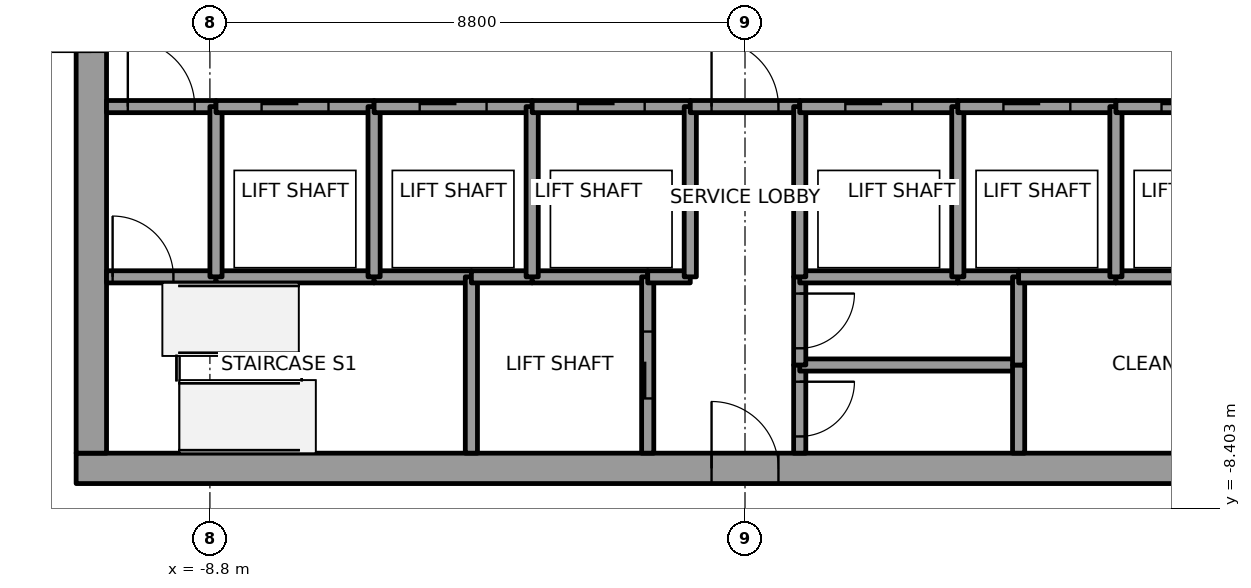
"""IFC4 building model, lengths in metres.
Left out: names, types, materials, properties, quantities, classifications, styles, units other than length and angle.
Written with IfcOpenShell. Run it as: python <this file> out.ifc"""

import sys

from ifc_helpers import new_model, si_unit, direction, frame, frame_2d, origin, place, context, subcontext, project, spatial, rectangle, extrude, element, fill, save


model = new_model("IFC4")
c1 = context("Model", 3, precision=1e-05, world=origin(), true_north=direction((0.0, 1.0)))
c2 = subcontext(c1, "Body", "Model", "MODEL_VIEW")
j1 = project(units=[si_unit("LENGTHUNIT", "METRE"), si_unit("PLANEANGLEUNIT", "RADIAN")], contexts=[c1])
p1 = place(None, origin())
s1 = spatial("IfcSite", under=j1, at=p1, CompositionType="ELEMENT")
p2 = place(p1, origin())
s2 = spatial("IfcBuilding", under=s1, at=p2, CompositionType="ELEMENT")
p3 = place(p2, frame((0.0, 0.0, 339.4)))
s3 = spatial("IfcBuildingStorey", under=s2, at=p3, CompositionType="ELEMENT", Elevation=339.4)
p4 = place(p3, frame((-11.0, -7.75, 0.0), z_axis=(0.0, 0.0, 1.0), x_axis=(1.0, 0.0, 0.0)))
e1 = element("IfcWall", 1, at=p4, inside=s3, PredefinedType="SHEAR", context=c2, shape_type="SweptSolid", body=[
    extrude(rectangle(XDim=22.0, YDim=0.5, at=frame_2d((11.0, 0.0))), origin(), (0.0, 0.0, 1.0), 5.4),
])
p5 = place(p4, frame((10.45, 0.0, 0.0)))
e2 = element("IfcOpeningElement", 2, at=p5, cuts=e1, PredefinedType="OPENING", context=c2, shape_type="SweptSolid", body=[
    extrude(rectangle(XDim=1.1, YDim=2.1, at=frame_2d((0.55, 1.05))), frame((0.0, 0.25, 0.0), z_axis=(0.0, -1.0, 0.0), x_axis=(1.0, 0.0, 0.0)), (0.0, 0.0, 1.0), 0.5),
])
p6 = place(p3, frame((-10.75, -7.5, 0.0), z_axis=(0.0, 0.0, 1.0), x_axis=(0.0, 1.0, 0.0)))
e3 = element("IfcWall", 3, at=p6, inside=s3, PredefinedType="SHEAR", context=c2, shape_type="SweptSolid", body=[
    extrude(rectangle(XDim=15.0, YDim=0.5, at=frame_2d((7.5, 0.0))), origin(), (0.0, 0.0, 1.0), 5.4),
])
p7 = place(p6, frame((6.6, 0.0, 0.0)))
e4 = element("IfcOpeningElement", 4, at=p7, cuts=e3, PredefinedType="OPENING", context=c2, shape_type="SweptSolid", body=[
    extrude(rectangle(XDim=1.8, YDim=2.1, at=frame_2d((0.9, 1.05))), frame((0.0, 0.25, 0.0), z_axis=(0.0, -1.0, 0.0), x_axis=(1.0, 0.0, 0.0)), (0.0, 0.0, 1.0), 0.5),
])
p8 = place(p3, frame((-10.5, -4.6, 0.0), z_axis=(0.0, 0.0, 1.0), x_axis=(1.0, 0.0, 0.0)))
e5 = element("IfcWall", 5, at=p8, inside=s3, PredefinedType="SOLIDWALL", context=c2, shape_type="SweptSolid", body=[
    extrude(rectangle(XDim=1.8, YDim=0.2, at=frame_2d((0.9, 0.0))), origin(), (0.0, 0.0, 1.0), 5.25),
])
p9 = place(p8, frame((0.1, 0.0, 0.0)))
e6 = element("IfcOpeningElement", 6, at=p9, cuts=e5, PredefinedType="OPENING", context=c2, shape_type="SweptSolid", body=[
    extrude(rectangle(XDim=1.0, YDim=2.1, at=frame_2d((0.5, 1.05))), frame((0.0, 0.1, 0.0), z_axis=(0.0, -1.0, 0.0), x_axis=(1.0, 0.0, 0.0)), (0.0, 0.0, 1.0), 0.2),
])
p10 = place(p3, frame((-10.5, -1.8, 0.0), z_axis=(0.0, 0.0, 1.0), x_axis=(1.0, 0.0, 0.0)))
e7 = element("IfcWall", 7, at=p10, inside=s3, PredefinedType="SOLIDWALL", context=c2, shape_type="SweptSolid", body=[
    extrude(rectangle(XDim=1.8, YDim=0.2, at=frame_2d((0.9, 0.0))), origin(), (0.0, 0.0, 1.0), 5.25),
])
p11 = place(p10, frame((0.35, 0.0, 0.0)))
e8 = element("IfcOpeningElement", 8, at=p11, cuts=e7, PredefinedType="OPENING", context=c2, shape_type="SweptSolid", body=[
    extrude(rectangle(XDim=1.1, YDim=2.1, at=frame_2d((0.55, 1.05))), frame((0.0, 0.1, 0.0), z_axis=(0.0, -1.0, 0.0), x_axis=(1.0, 0.0, 0.0)), (0.0, 0.0, 1.0), 0.2),
])
p12 = place(p3, frame((-8.7, -4.6, 0.0), z_axis=(0.0, 0.0, 1.0), x_axis=(1.0, 0.0, 0.0)))
e9 = element("IfcWall", 9, at=p12, inside=s3, PredefinedType="SOLIDWALL", context=c2, shape_type="SweptSolid", body=[
    extrude(rectangle(XDim=2.6, YDim=0.2, at=frame_2d((1.3, 0.0))), origin(), (0.0, 0.0, 1.0), 5.25),
])
p13 = place(p3, frame((-8.7, -4.6, 0.0), z_axis=(0.0, 0.0, 1.0), x_axis=(0.0, 1.0, 0.0)))
e10 = element("IfcWall", 10, at=p13, inside=s3, PredefinedType="SOLIDWALL", context=c2, shape_type="SweptSolid", body=[
    extrude(rectangle(XDim=2.8, YDim=0.2, at=frame_2d((1.4, 0.0))), origin(), (0.0, 0.0, 1.0), 5.25),
])
p14 = place(p3, frame((-8.7, -1.8, 0.0), z_axis=(0.0, 0.0, 1.0), x_axis=(1.0, 0.0, 0.0)))
e11 = element("IfcWall", 11, at=p14, inside=s3, PredefinedType="SOLIDWALL", context=c2, shape_type="SweptSolid", body=[
    extrude(rectangle(XDim=2.6, YDim=0.2, at=frame_2d((1.3, 0.0))), origin(), (0.0, 0.0, 1.0), 5.25),
])
p15 = place(p14, frame((0.75, 0.0, 0.0)))
e12 = element("IfcOpeningElement", 12, at=p15, cuts=e11, PredefinedType="OPENING", context=c2, shape_type="SweptSolid", body=[
    extrude(rectangle(XDim=1.1, YDim=2.1, at=frame_2d((0.55, 1.05))), frame((0.0, 0.1, 0.0), z_axis=(0.0, -1.0, 0.0), x_axis=(1.0, 0.0, 0.0)), (0.0, 0.0, 1.0), 0.2),
])
p16 = place(p3, frame((-6.1, -4.6, 0.0), z_axis=(0.0, 0.0, 1.0), x_axis=(1.0, 0.0, 0.0)))
e13 = element("IfcWall", 13, at=p16, inside=s3, PredefinedType="SOLIDWALL", context=c2, shape_type="SweptSolid", body=[
    extrude(rectangle(XDim=1.6, YDim=0.2, at=frame_2d((0.8, 0.0))), origin(), (0.0, 0.0, 1.0), 5.25),
])
p17 = place(p3, frame((-6.1, -4.6, 0.0), z_axis=(0.0, 0.0, 1.0), x_axis=(0.0, 1.0, 0.0)))
e14 = element("IfcWall", 14, at=p17, inside=s3, PredefinedType="SOLIDWALL", context=c2, shape_type="SweptSolid", body=[
    extrude(rectangle(XDim=2.8, YDim=0.2, at=frame_2d((1.4, 0.0))), origin(), (0.0, 0.0, 1.0), 5.25),
])
p18 = place(p3, frame((-6.1, -1.8, 0.0), z_axis=(0.0, 0.0, 1.0), x_axis=(1.0, 0.0, 0.0)))
e15 = element("IfcWall", 15, at=p18, inside=s3, PredefinedType="SOLIDWALL", context=c2, shape_type="SweptSolid", body=[
    extrude(rectangle(XDim=2.6, YDim=0.2, at=frame_2d((1.3, 0.0))), origin(), (0.0, 0.0, 1.0), 5.25),
])
p19 = place(p18, frame((0.75, 0.0, 0.0)))
e16 = element("IfcOpeningElement", 16, at=p19, cuts=e15, PredefinedType="OPENING", context=c2, shape_type="SweptSolid", body=[
    extrude(rectangle(XDim=1.1, YDim=2.1, at=frame_2d((0.55, 1.05))), frame((0.0, 0.1, 0.0), z_axis=(0.0, -1.0, 0.0), x_axis=(1.0, 0.0, 0.0)), (0.0, 0.0, 1.0), 0.2),
])
p20 = place(p3, frame((-4.5, -4.6, 0.0), z_axis=(0.0, 0.0, 1.0), x_axis=(0.0, -1.0, 0.0)))
e17 = element("IfcWall", 17, at=p20, inside=s3, PredefinedType="SOLIDWALL", context=c2, shape_type="SweptSolid", body=[
    extrude(rectangle(XDim=2.9, YDim=0.2, at=frame_2d((1.45, 0.0))), origin(), (0.0, 0.0, 1.0), 5.25),
])
p21 = place(p3, frame((-4.5, -4.6, 0.0), z_axis=(0.0, 0.0, 1.0), x_axis=(1.0, 0.0, 0.0)))
e18 = element("IfcWall", 18, at=p21, inside=s3, PredefinedType="SOLIDWALL", context=c2, shape_type="SweptSolid", body=[
    extrude(rectangle(XDim=1.0, YDim=0.2, at=frame_2d((0.5, 0.0))), origin(), (0.0, 0.0, 1.0), 5.25),
])
p22 = place(p3, frame((-3.5, -4.6, 0.0), z_axis=(0.0, 0.0, 1.0), x_axis=(1.0, 0.0, 0.0)))
e19 = element("IfcWall", 19, at=p22, inside=s3, PredefinedType="SOLIDWALL", context=c2, shape_type="SweptSolid", body=[
    extrude(rectangle(XDim=1.9, YDim=0.2, at=frame_2d((0.95, 0.0))), origin(), (0.0, 0.0, 1.0), 5.25),
])
p23 = place(p3, frame((-3.5, -4.6, 0.0), z_axis=(0.0, 0.0, 1.0), x_axis=(0.0, 1.0, 0.0)))
e20 = element("IfcWall", 20, at=p23, inside=s3, PredefinedType="SOLIDWALL", context=c2, shape_type="SweptSolid", body=[
    extrude(rectangle(XDim=2.8, YDim=0.2, at=frame_2d((1.4, 0.0))), origin(), (0.0, 0.0, 1.0), 5.25),
])
p24 = place(p3, frame((-3.5, -1.8, 0.0), z_axis=(0.0, 0.0, 1.0), x_axis=(1.0, 0.0, 0.0)))
e21 = element("IfcWall", 21, at=p24, inside=s3, PredefinedType="SOLIDWALL", context=c2, shape_type="SweptSolid", body=[
    extrude(rectangle(XDim=2.6, YDim=0.2, at=frame_2d((1.3, 0.0))), origin(), (0.0, 0.0, 1.0), 5.25),
])
p25 = place(p24, frame((0.75, 0.0, 0.0)))
e22 = element("IfcOpeningElement", 22, at=p25, cuts=e21, PredefinedType="OPENING", context=c2, shape_type="SweptSolid", body=[
    extrude(rectangle(XDim=1.1, YDim=2.1, at=frame_2d((0.55, 1.05))), frame((0.0, 0.1, 0.0), z_axis=(0.0, -1.0, 0.0), x_axis=(1.0, 0.0, 0.0)), (0.0, 0.0, 1.0), 0.2),
])
p26 = place(p3, frame((-1.6, -7.5, 0.0), z_axis=(0.0, 0.0, 1.0), x_axis=(0.0, 1.0, 0.0)))
e23 = element("IfcWall", 23, at=p26, inside=s3, PredefinedType="SOLIDWALL", context=c2, shape_type="SweptSolid", body=[
    extrude(rectangle(XDim=2.9, YDim=0.2, at=frame_2d((1.45, 0.0))), origin(), (0.0, 0.0, 1.0), 5.25),
])
p27 = place(p26, frame((0.9, 0.0, 0.0)))
e24 = element("IfcOpeningElement", 24, at=p27, cuts=e23, PredefinedType="OPENING", context=c2, shape_type="SweptSolid", body=[
    extrude(rectangle(XDim=1.1, YDim=2.1, at=frame_2d((0.55, 1.05))), frame((0.0, 0.1, 0.0), z_axis=(0.0, -1.0, 0.0), x_axis=(1.0, 0.0, 0.0)), (0.0, 0.0, 1.0), 0.2),
])
p28 = place(p3, frame((-1.6, -4.6, 0.0), z_axis=(0.0, 0.0, 1.0), x_axis=(1.0, 0.0, 0.0)))
e25 = element("IfcWall", 25, at=p28, inside=s3, PredefinedType="SOLIDWALL", context=c2, shape_type="SweptSolid", body=[
    extrude(rectangle(XDim=0.7, YDim=0.2, at=frame_2d((0.35, 0.0))), origin(), (0.0, 0.0, 1.0), 5.25),
])
p29 = place(p3, frame((-0.9, -4.6, 0.0), z_axis=(0.0, 0.0, 1.0), x_axis=(0.0, 1.0, 0.0)))
e26 = element("IfcWall", 26, at=p29, inside=s3, PredefinedType="SOLIDWALL", context=c2, shape_type="SweptSolid", body=[
    extrude(rectangle(XDim=2.8, YDim=0.2, at=frame_2d((1.4, 0.0))), origin(), (0.0, 0.0, 1.0), 5.25),
])
p30 = place(p3, frame((-0.9, -1.8, 0.0), z_axis=(0.0, 0.0, 1.0), x_axis=(1.0, 0.0, 0.0)))
e27 = element("IfcWall", 27, at=p30, inside=s3, PredefinedType="SOLIDWALL", context=c2, shape_type="SweptSolid", body=[
    extrude(rectangle(XDim=1.8, YDim=0.2, at=frame_2d((0.9, 0.0))), origin(), (0.0, 0.0, 1.0), 5.25),
])
p31 = place(p30, frame((0.35, 0.0, 0.0)))
e28 = element("IfcOpeningElement", 28, at=p31, cuts=e27, PredefinedType="OPENING", context=c2, shape_type="SweptSolid", body=[
    extrude(rectangle(XDim=1.1, YDim=2.1, at=frame_2d((0.55, 1.05))), frame((0.0, 0.1, 0.0), z_axis=(0.0, -1.0, 0.0), x_axis=(1.0, 0.0, 0.0)), (0.0, 0.0, 1.0), 0.2),
])
p32 = place(p3, frame((0.9, -6.05, 0.0), z_axis=(0.0, 0.0, 1.0), x_axis=(0.0, -1.0, 0.0)))
e29 = element("IfcWall", 29, at=p32, inside=s3, PredefinedType="SOLIDWALL", context=c2, shape_type="SweptSolid", body=[
    extrude(rectangle(XDim=1.45, YDim=0.2, at=frame_2d((0.725, 0.0))), origin(), (0.0, 0.0, 1.0), 5.25),
])
p33 = place(p32, frame((0.275, 0.0, 0.0)))
e30 = element("IfcOpeningElement", 30, at=p33, cuts=e29, PredefinedType="OPENING", context=c2, shape_type="SweptSolid", body=[
    extrude(rectangle(XDim=0.9, YDim=2.1, at=frame_2d((0.45, 1.05))), frame((0.0, 0.1, 0.0), z_axis=(0.0, -1.0, 0.0), x_axis=(1.0, 0.0, 0.0)), (0.0, 0.0, 1.0), 0.2),
])
p34 = place(p3, frame((4.5, -6.05, 0.0), z_axis=(0.0, 0.0, 1.0), x_axis=(-1.0, 0.0, 0.0)))
e31 = element("IfcWall", 31, at=p34, inside=s3, PredefinedType="SOLIDWALL", context=c2, shape_type="SweptSolid", body=[
    extrude(rectangle(XDim=3.6, YDim=0.2, at=frame_2d((1.8, 0.0))), origin(), (0.0, 0.0, 1.0), 5.25),
])
p35 = place(p3, frame((0.9, -4.6, 0.0), z_axis=(0.0, 0.0, 1.0), x_axis=(0.0, -1.0, 0.0)))
e32 = element("IfcWall", 32, at=p35, inside=s3, PredefinedType="SOLIDWALL", context=c2, shape_type="SweptSolid", body=[
    extrude(rectangle(XDim=1.45, YDim=0.2, at=frame_2d((0.725, 0.0))), origin(), (0.0, 0.0, 1.0), 5.25),
])
p36 = place(p35, frame((0.275, 0.0, 0.0)))
e33 = element("IfcOpeningElement", 33, at=p36, cuts=e32, PredefinedType="OPENING", context=c2, shape_type="SweptSolid", body=[
    extrude(rectangle(XDim=0.9, YDim=2.1, at=frame_2d((0.45, 1.05))), frame((0.0, 0.1, 0.0), z_axis=(0.0, -1.0, 0.0), x_axis=(1.0, 0.0, 0.0)), (0.0, 0.0, 1.0), 0.2),
])
p37 = place(p3, frame((3.5, -4.6, 0.0), z_axis=(0.0, 0.0, 1.0), x_axis=(-1.0, 0.0, 0.0)))
e34 = element("IfcWall", 34, at=p37, inside=s3, PredefinedType="SOLIDWALL", context=c2, shape_type="SweptSolid", body=[
    extrude(rectangle(XDim=2.6, YDim=0.2, at=frame_2d((1.3, 0.0))), origin(), (0.0, 0.0, 1.0), 5.25),
])
p38 = place(p3, frame((0.9, -1.8, 0.0), z_axis=(0.0, 0.0, 1.0), x_axis=(0.0, -1.0, 0.0)))
e35 = element("IfcWall", 35, at=p38, inside=s3, PredefinedType="SOLIDWALL", context=c2, shape_type="SweptSolid", body=[
    extrude(rectangle(XDim=2.8, YDim=0.2, at=frame_2d((1.4, 0.0))), origin(), (0.0, 0.0, 1.0), 5.25),
])
p39 = place(p3, frame((0.9, -1.8, 0.0), z_axis=(0.0, 0.0, 1.0), x_axis=(1.0, 0.0, 0.0)))
e36 = element("IfcWall", 36, at=p39, inside=s3, PredefinedType="SOLIDWALL", context=c2, shape_type="SweptSolid", body=[
    extrude(rectangle(XDim=2.6, YDim=0.2, at=frame_2d((1.3, 0.0))), origin(), (0.0, 0.0, 1.0), 5.25),
])
p40 = place(p39, frame((0.75, 0.0, 0.0)))
e37 = element("IfcOpeningElement", 37, at=p40, cuts=e36, PredefinedType="OPENING", context=c2, shape_type="SweptSolid", body=[
    extrude(rectangle(XDim=1.1, YDim=2.1, at=frame_2d((0.55, 1.05))), frame((0.0, 0.1, 0.0), z_axis=(0.0, -1.0, 0.0), x_axis=(1.0, 0.0, 0.0)), (0.0, 0.0, 1.0), 0.2),
])
p41 = place(p3, frame((4.5, -4.6, 0.0), z_axis=(0.0, 0.0, 1.0), x_axis=(-1.0, 0.0, 0.0)))
e38 = element("IfcWall", 38, at=p41, inside=s3, PredefinedType="SOLIDWALL", context=c2, shape_type="SweptSolid", body=[
    extrude(rectangle(XDim=1.0, YDim=0.2, at=frame_2d((0.5, 0.0))), origin(), (0.0, 0.0, 1.0), 5.25),
])
p42 = place(p3, frame((3.5, -4.6, 0.0), z_axis=(0.0, 0.0, 1.0), x_axis=(0.0, 1.0, 0.0)))
e39 = element("IfcWall", 39, at=p42, inside=s3, PredefinedType="SOLIDWALL", context=c2, shape_type="SweptSolid", body=[
    extrude(rectangle(XDim=2.8, YDim=0.2, at=frame_2d((1.4, 0.0))), origin(), (0.0, 0.0, 1.0), 5.25),
])
p43 = place(p3, frame((3.5, -1.8, 0.0), z_axis=(0.0, 0.0, 1.0), x_axis=(1.0, 0.0, 0.0)))
e40 = element("IfcWall", 40, at=p43, inside=s3, PredefinedType="SOLIDWALL", context=c2, shape_type="SweptSolid", body=[
    extrude(rectangle(XDim=2.6, YDim=0.2, at=frame_2d((1.3, 0.0))), origin(), (0.0, 0.0, 1.0), 5.25),
])
p44 = place(p43, frame((0.75, 0.0, 0.0)))
e41 = element("IfcOpeningElement", 41, at=p44, cuts=e40, PredefinedType="OPENING", context=c2, shape_type="SweptSolid", body=[
    extrude(rectangle(XDim=1.1, YDim=2.1, at=frame_2d((0.55, 1.05))), frame((0.0, 0.1, 0.0), z_axis=(0.0, -1.0, 0.0), x_axis=(1.0, 0.0, 0.0)), (0.0, 0.0, 1.0), 0.2),
])
for number, where, z_axis, x_axis in (
    (42, (4.5, -6.05, 0.0), (0.0, 0.0, 1.0), (0.0, -1.0, 0.0)),
    (43, (4.5, -4.6, 0.0), (0.0, 0.0, 1.0), (0.0, -1.0, 0.0)),
):
    element("IfcWall", number, at=place(p3, frame(where, z_axis=z_axis, x_axis=x_axis)), inside=s3, PredefinedType="SOLIDWALL", context=c2, shape_type="SweptSolid", body=[
        extrude(rectangle(XDim=1.45, YDim=0.2, at=frame_2d((0.725, 0.0))), origin(), (0.0, 0.0, 1.0), 5.25),
    ])
p45 = place(p3, frame((6.1, -4.6, 0.0), z_axis=(0.0, 0.0, 1.0), x_axis=(-1.0, 0.0, 0.0)))
e44 = element("IfcWall", 44, at=p45, inside=s3, PredefinedType="SOLIDWALL", context=c2, shape_type="SweptSolid", body=[
    extrude(rectangle(XDim=1.6, YDim=0.2, at=frame_2d((0.8, 0.0))), origin(), (0.0, 0.0, 1.0), 5.25),
])
p46 = place(p3, frame((8.7, -4.6, 0.0), z_axis=(0.0, 0.0, 1.0), x_axis=(-1.0, 0.0, 0.0)))
e45 = element("IfcWall", 45, at=p46, inside=s3, PredefinedType="SOLIDWALL", context=c2, shape_type="SweptSolid", body=[
    extrude(rectangle(XDim=2.6, YDim=0.2, at=frame_2d((1.3, 0.0))), origin(), (0.0, 0.0, 1.0), 5.25),
])
p47 = place(p3, frame((6.1, -4.6, 0.0), z_axis=(0.0, 0.0, 1.0), x_axis=(0.0, 1.0, 0.0)))
e46 = element("IfcWall", 46, at=p47, inside=s3, PredefinedType="SOLIDWALL", context=c2, shape_type="SweptSolid", body=[
    extrude(rectangle(XDim=2.8, YDim=0.2, at=frame_2d((1.4, 0.0))), origin(), (0.0, 0.0, 1.0), 5.25),
])
p48 = place(p3, frame((6.1, -1.8, 0.0), z_axis=(0.0, 0.0, 1.0), x_axis=(1.0, 0.0, 0.0)))
e47 = element("IfcWall", 47, at=p48, inside=s3, PredefinedType="SOLIDWALL", context=c2, shape_type="SweptSolid", body=[
    extrude(rectangle(XDim=2.6, YDim=0.2, at=frame_2d((1.3, 0.0))), origin(), (0.0, 0.0, 1.0), 5.25),
])
p49 = place(p48, frame((0.75, 0.0, 0.0)))
e48 = element("IfcOpeningElement", 48, at=p49, cuts=e47, PredefinedType="OPENING", context=c2, shape_type="SweptSolid", body=[
    extrude(rectangle(XDim=1.1, YDim=2.1, at=frame_2d((0.55, 1.05))), frame((0.0, 0.1, 0.0), z_axis=(0.0, -1.0, 0.0), x_axis=(1.0, 0.0, 0.0)), (0.0, 0.0, 1.0), 0.2),
])
p50 = place(p15, origin())
e49 = element("IfcDoor", 49, at=p50, inside=s3, OperationType="SLIDING_TO_RIGHT", PredefinedType="DOOR", context=c2, shape_type="SweptSolid", body=[
    extrude(rectangle(XDim=1.1, YDim=2.1, at=frame_2d((0.55, 1.05))), frame((0.0, 0.025, 0.0), z_axis=(0.0, -1.0, 0.0), x_axis=(1.0, 0.0, 0.0)), (0.0, 0.0, 1.0), 0.05),
])
fill(e12, e49)
p51 = place(p19, origin())
e50 = element("IfcDoor", 50, at=p51, inside=s3, OperationType="SLIDING_TO_RIGHT", PredefinedType="DOOR", context=c2, shape_type="SweptSolid", body=[
    extrude(rectangle(XDim=1.1, YDim=2.1, at=frame_2d((0.55, 1.05))), frame((0.0, 0.025, 0.0), z_axis=(0.0, -1.0, 0.0), x_axis=(1.0, 0.0, 0.0)), (0.0, 0.0, 1.0), 0.05),
])
fill(e16, e50)
p52 = place(p25, origin())
e51 = element("IfcDoor", 51, at=p52, inside=s3, OperationType="SLIDING_TO_RIGHT", PredefinedType="DOOR", context=c2, shape_type="SweptSolid", body=[
    extrude(rectangle(XDim=1.1, YDim=2.1, at=frame_2d((0.55, 1.05))), frame((0.0, 0.025, 0.0), z_axis=(0.0, -1.0, 0.0), x_axis=(1.0, 0.0, 0.0)), (0.0, 0.0, 1.0), 0.05),
])
fill(e22, e51)
p53 = place(p40, origin())
e52 = element("IfcDoor", 52, at=p53, inside=s3, OperationType="SLIDING_TO_RIGHT", PredefinedType="DOOR", context=c2, shape_type="SweptSolid", body=[
    extrude(rectangle(XDim=1.1, YDim=2.1, at=frame_2d((0.55, 1.05))), frame((0.0, 0.025, 0.0), z_axis=(0.0, -1.0, 0.0), x_axis=(1.0, 0.0, 0.0)), (0.0, 0.0, 1.0), 0.05),
])
fill(e37, e52)
p54 = place(p44, origin())
e53 = element("IfcDoor", 53, at=p54, inside=s3, OperationType="SLIDING_TO_RIGHT", PredefinedType="DOOR", context=c2, shape_type="SweptSolid", body=[
    extrude(rectangle(XDim=1.1, YDim=2.1, at=frame_2d((0.55, 1.05))), frame((0.0, 0.025, 0.0), z_axis=(0.0, -1.0, 0.0), x_axis=(1.0, 0.0, 0.0)), (0.0, 0.0, 1.0), 0.05),
])
fill(e41, e53)
p55 = place(p49, origin())
e54 = element("IfcDoor", 54, at=p55, inside=s3, OperationType="SLIDING_TO_RIGHT", PredefinedType="DOOR", context=c2, shape_type="SweptSolid", body=[
    extrude(rectangle(XDim=1.1, YDim=2.1, at=frame_2d((0.55, 1.05))), frame((0.0, 0.025, 0.0), z_axis=(0.0, -1.0, 0.0), x_axis=(1.0, 0.0, 0.0)), (0.0, 0.0, 1.0), 0.05),
])
fill(e48, e54)
p56 = place(p27, origin())
e55 = element("IfcDoor", 55, at=p56, inside=s3, OperationType="SLIDING_TO_RIGHT", PredefinedType="DOOR", context=c2, shape_type="SweptSolid", body=[
    extrude(rectangle(XDim=1.1, YDim=2.1, at=frame_2d((0.55, 1.05))), frame((0.0, 0.025, 0.0), z_axis=(0.0, -1.0, 0.0), x_axis=(1.0, 0.0, 0.0)), (0.0, 0.0, 1.0), 0.05),
])
fill(e24, e55)
p57 = place(p11, origin())
e56 = element("IfcDoor", 56, at=p57, inside=s3, OperationType="SINGLE_SWING_RIGHT", PredefinedType="DOOR", context=c2, shape_type="SweptSolid", body=[
    extrude(rectangle(XDim=1.1, YDim=2.1, at=frame_2d((0.55, 1.05))), frame((0.0, 0.025, 0.0), z_axis=(0.0, -1.0, 0.0), x_axis=(1.0, 0.0, 0.0)), (0.0, 0.0, 1.0), 0.05),
])
fill(e8, e56)
p58 = place(p31, origin())
e57 = element("IfcDoor", 57, at=p58, inside=s3, OperationType="SINGLE_SWING_LEFT", PredefinedType="DOOR", context=c2, shape_type="SweptSolid", body=[
    extrude(rectangle(XDim=1.1, YDim=2.1, at=frame_2d((0.55, 1.05))), frame((0.0, 0.025, 0.0), z_axis=(0.0, -1.0, 0.0), x_axis=(1.0, 0.0, 0.0)), (0.0, 0.0, 1.0), 0.05),
])
fill(e28, e57)
p59 = place(p9, origin())
e58 = element("IfcDoor", 58, at=p59, inside=s3, OperationType="SINGLE_SWING_LEFT", PredefinedType="DOOR", context=c2, shape_type="SweptSolid", body=[
    extrude(rectangle(XDim=1.0, YDim=2.1, at=frame_2d((0.5, 1.05))), frame((0.0, 0.025, 0.0), z_axis=(0.0, -1.0, 0.0), x_axis=(1.0, 0.0, 0.0)), (0.0, 0.0, 1.0), 0.05),
])
fill(e6, e58)
p60 = place(p33, origin())
e59 = element("IfcDoor", 59, at=p60, inside=s3, OperationType="SINGLE_SWING_RIGHT", PredefinedType="DOOR", context=c2, shape_type="SweptSolid", body=[
    extrude(rectangle(XDim=0.9, YDim=2.1, at=frame_2d((0.45, 1.05))), frame((0.0, 0.025, 0.0), z_axis=(0.0, -1.0, 0.0), x_axis=(1.0, 0.0, 0.0)), (0.0, 0.0, 1.0), 0.05),
])
fill(e30, e59)
p61 = place(p36, origin())
e60 = element("IfcDoor", 60, at=p61, inside=s3, OperationType="SINGLE_SWING_RIGHT", PredefinedType="DOOR", context=c2, shape_type="SweptSolid", body=[
    extrude(rectangle(XDim=0.9, YDim=2.1, at=frame_2d((0.45, 1.05))), frame((0.0, 0.025, 0.0), z_axis=(0.0, -1.0, 0.0), x_axis=(1.0, 0.0, 0.0)), (0.0, 0.0, 1.0), 0.05),
])
fill(e33, e60)
p62 = place(p7, origin())
e61 = element("IfcDoor", 61, at=p62, inside=s3, OperationType="DOUBLE_DOOR_SINGLE_SWING", PredefinedType="DOOR", context=c2, shape_type="SweptSolid", body=[
    extrude(rectangle(XDim=1.8, YDim=2.1, at=frame_2d((0.9, 1.05))), frame((0.0, 0.025, 0.0), z_axis=(0.0, -1.0, 0.0), x_axis=(1.0, 0.0, 0.0)), (0.0, 0.0, 1.0), 0.05),
])
fill(e4, e61)
p63 = place(p5, origin())
e62 = element("IfcDoor", 62, at=p63, inside=s3, OperationType="SINGLE_SWING_LEFT", PredefinedType="DOOR", context=c2, shape_type="SweptSolid", body=[
    extrude(rectangle(XDim=1.1, YDim=2.1, at=frame_2d((0.55, 1.05))), frame((0.0, 0.025, 0.0), z_axis=(0.0, -1.0, 0.0), x_axis=(1.0, 0.0, 0.0)), (0.0, 0.0, 1.0), 0.05),
])
fill(e2, e62)
save(model, sys.argv[1])
